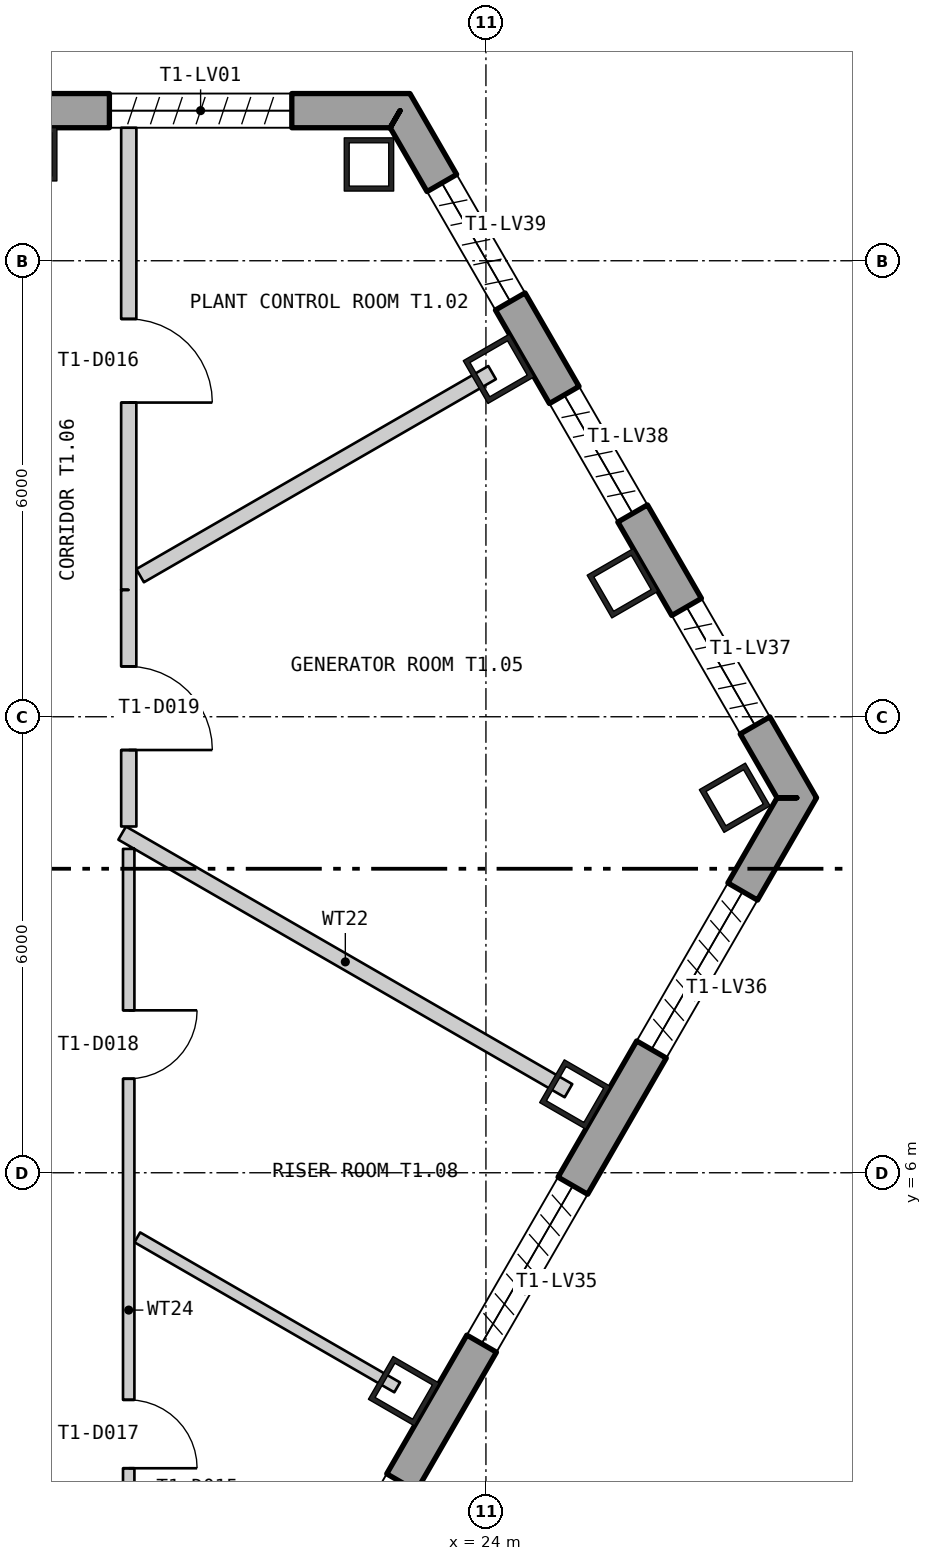
"""IFC4 building model, lengths in metres.
Left out: names, types, materials, properties, quantities, classifications, styles, units other than length and angle.
Written with IfcOpenShell. Run it as: python <this file> out.ifc"""

import sys

from ifc_helpers import new_model, si_unit, direction, frame, frame_2d, origin, origin_2d, place, context, subcontext, project, spatial, polyline, rectangle, hollow_rectangle, outline, extrude, element, fill, save


model = new_model("IFC4")
c1 = context("Model", 3, precision=1e-05, world=origin(), true_north=direction((0.0, 1.0)))
c2 = subcontext(c1, "Body", "Model", "MODEL_VIEW")
j1 = project(units=[si_unit("LENGTHUNIT", "METRE"), si_unit("PLANEANGLEUNIT", "RADIAN")], contexts=[c1])
p1 = place(None, origin())
s1 = spatial("IfcSite", under=j1, at=p1, CompositionType="ELEMENT")
p2 = place(p1, origin())
s2 = spatial("IfcBuilding", under=s1, at=p2, CompositionType="ELEMENT")
p3 = place(p2, frame((0.0, 0.0, 78.3)))
s3 = spatial("IfcBuildingStorey", under=s2, at=p3, CompositionType="ELEMENT", Elevation=78.3)
for number, where, z_axis, x_axis in (
    (1, (22.461, 19.267, 0.0), (0.0, 0.0, 1.0), (-1.0, 0.0, 0.0)),
    (2, (18.03, 19.4, 0.0), (0.0, 0.0, 1.0), (-1.0, 0.0, 0.0)),
    (3, (22.919, 3.126, 0.0), (0.0, 0.0, 1.0), (0.5, 0.866, 0.0)),
    (4, (25.172, 7.03, 0.0), (0.0, 0.0, 1.0), (0.5, 0.866, 0.0)),
    (5, (27.273, 10.934, 0.0), (0.0, 0.0, 1.0), (-0.5, 0.866, 0.0)),
    (6, (25.797, 13.756, 0.0), (0.0, 0.0, 1.0), (-0.5, 0.866, 0.0)),
    (7, (24.167, 16.578, 0.0), (0.0, 0.0, 1.0), (-0.5, 0.866, 0.0)),
):
    element("IfcColumn", number, at=place(p3, frame(where, z_axis=z_axis, x_axis=x_axis)), inside=s3, PredefinedType="COLUMN", context=c2, shape_type="SweptSolid", body=[
        extrude(hollow_rectangle(XDim=0.65, YDim=0.7, WallThickness=0.065, at=origin_2d()), origin(), (0.0, 0.0, 1.0), 6.0),
    ])
p4 = place(p3, frame((22.87, 19.975, -0.4), z_axis=(0.0, 0.0, 1.0), x_axis=(-1.0, 0.0, 0.0)))
e8 = element("IfcWall", 8, at=p4, inside=s3, PredefinedType="SOLIDWALL", context=c2, shape_type="SweptSolid", body=[
    extrude(outline(polyline([(-0.13, -0.225), (45.87, -0.225), (45.61, 0.225), (0.13, 0.225), (-0.13, -0.225)])), origin(), (0.0, 0.0, 1.0), 6.0),
])
p5 = place(p4, frame((1.424, 0.0, 1.6)))
e9 = element("IfcOpeningElement", 9, at=p5, cuts=e8, PredefinedType="OPENING", context=c2, shape_type="SweptSolid", body=[
    extrude(rectangle(XDim=2.4, YDim=3.6, at=frame_2d((1.2, 1.8))), frame((0.0, 0.235, 0.0), z_axis=(0.0, -1.0, 0.0), x_axis=(1.0, 0.0, 0.0)), (0.0, 0.0, 1.0), 0.47),
])
p6 = place(p4, frame((5.893, 0.0, 1.6)))
e10 = element("IfcOpeningElement", 10, at=p6, cuts=e8, PredefinedType="OPENING", context=c2, shape_type="SweptSolid", body=[
    extrude(rectangle(XDim=2.4, YDim=3.6, at=frame_2d((1.2, 1.8))), frame((0.0, 0.235, 0.0), z_axis=(0.0, -1.0, 0.0), x_axis=(1.0, 0.0, 0.0)), (0.0, 0.0, 1.0), 0.47),
])
p7 = place(p4, frame((10.401, 0.0, 1.6)))
e11 = element("IfcOpeningElement", 11, at=p7, cuts=e8, PredefinedType="OPENING", context=c2, shape_type="SweptSolid", body=[
    extrude(rectangle(XDim=2.4, YDim=3.6, at=frame_2d((1.2, 1.8))), frame((0.0, 0.235, 0.0), z_axis=(0.0, -1.0, 0.0), x_axis=(1.0, 0.0, 0.0)), (0.0, 0.0, 1.0), 0.47),
])
p8 = place(p4, frame((14.909, 0.0, 1.6)))
e12 = element("IfcOpeningElement", 12, at=p8, cuts=e8, PredefinedType="OPENING", context=c2, shape_type="SweptSolid", body=[
    extrude(rectangle(XDim=2.4, YDim=3.6, at=frame_2d((1.2, 1.8))), frame((0.0, 0.235, 0.0), z_axis=(0.0, -1.0, 0.0), x_axis=(1.0, 0.0, 0.0)), (0.0, 0.0, 1.0), 0.47),
])
p9 = place(p4, frame((19.416, 0.0, 1.6)))
e13 = element("IfcOpeningElement", 13, at=p9, cuts=e8, PredefinedType="OPENING", context=c2, shape_type="SweptSolid", body=[
    extrude(rectangle(XDim=2.4, YDim=3.6, at=frame_2d((1.2, 1.8))), frame((0.0, 0.235, 0.0), z_axis=(0.0, -1.0, 0.0), x_axis=(1.0, 0.0, 0.0)), (0.0, 0.0, 1.0), 0.47),
])
p10 = place(p4, frame((23.924, 0.0, 1.6)))
e14 = element("IfcOpeningElement", 14, at=p10, cuts=e8, PredefinedType="OPENING", context=c2, shape_type="SweptSolid", body=[
    extrude(rectangle(XDim=2.4, YDim=3.6, at=frame_2d((1.2, 1.8))), frame((0.0, 0.235, 0.0), z_axis=(0.0, -1.0, 0.0), x_axis=(1.0, 0.0, 0.0)), (0.0, 0.0, 1.0), 0.47),
])
p11 = place(p4, frame((28.431, 0.0, 1.6)))
e15 = element("IfcOpeningElement", 15, at=p11, cuts=e8, PredefinedType="OPENING", context=c2, shape_type="SweptSolid", body=[
    extrude(rectangle(XDim=2.4, YDim=3.6, at=frame_2d((1.2, 1.8))), frame((0.0, 0.235, 0.0), z_axis=(0.0, -1.0, 0.0), x_axis=(1.0, 0.0, 0.0)), (0.0, 0.0, 1.0), 0.47),
])
p12 = place(p4, frame((32.939, 0.0, 1.6)))
e16 = element("IfcOpeningElement", 16, at=p12, cuts=e8, PredefinedType="OPENING", context=c2, shape_type="SweptSolid", body=[
    extrude(rectangle(XDim=2.4, YDim=3.6, at=frame_2d((1.2, 1.8))), frame((0.0, 0.235, 0.0), z_axis=(0.0, -1.0, 0.0), x_axis=(1.0, 0.0, 0.0)), (0.0, 0.0, 1.0), 0.47),
])
p13 = place(p4, frame((37.447, 0.0, 1.6)))
e17 = element("IfcOpeningElement", 17, at=p13, cuts=e8, PredefinedType="OPENING", context=c2, shape_type="SweptSolid", body=[
    extrude(rectangle(XDim=2.4, YDim=3.6, at=frame_2d((1.2, 1.8))), frame((0.0, 0.235, 0.0), z_axis=(0.0, -1.0, 0.0), x_axis=(1.0, 0.0, 0.0)), (0.0, 0.0, 1.0), 0.47),
])
p14 = place(p4, frame((41.916, 0.0, 1.6)))
e18 = element("IfcOpeningElement", 18, at=p14, cuts=e8, PredefinedType="OPENING", context=c2, shape_type="SweptSolid", body=[
    extrude(rectangle(XDim=2.4, YDim=3.6, at=frame_2d((1.2, 1.8))), frame((0.0, 0.235, 0.0), z_axis=(0.0, -1.0, 0.0), x_axis=(1.0, 0.0, 0.0)), (0.0, 0.0, 1.0), 0.47),
])
p15 = place(p3, frame((5.22, -28.679, -0.18), z_axis=(0.0, 0.0, 1.0), x_axis=(0.500000711659, 0.866024992908, 0.0)))
e19 = element("IfcWall", 19, at=p15, inside=s3, PredefinedType="SOLIDWALL", context=c2, shape_type="SweptSolid", body=[
    extrude(outline(polyline([(-0.13, -0.225), (45.87, -0.225), (45.61, 0.225), (0.13, 0.225), (-0.13, -0.225)])), origin(), (0.0, 0.0, 1.0), 6.0),
])
p16 = place(p15, frame((1.424, 0.0, 1.38)))
e20 = element("IfcOpeningElement", 20, at=p16, cuts=e19, PredefinedType="OPENING", context=c2, shape_type="SweptSolid", body=[
    extrude(rectangle(XDim=2.4, YDim=3.6, at=frame_2d((1.2, 1.8))), frame((0.0, 0.235, 0.0), z_axis=(0.0, -1.0, 0.0), x_axis=(1.0, 0.0, 0.0)), (0.0, 0.0, 1.0), 0.47),
])
p17 = place(p15, frame((5.893, 0.0, 1.38)))
e21 = element("IfcOpeningElement", 21, at=p17, cuts=e19, PredefinedType="OPENING", context=c2, shape_type="SweptSolid", body=[
    extrude(rectangle(XDim=2.4, YDim=3.6, at=frame_2d((1.2, 1.8))), frame((0.0, 0.235, 0.0), z_axis=(0.0, -1.0, 0.0), x_axis=(1.0, 0.0, 0.0)), (0.0, 0.0, 1.0), 0.47),
])
p18 = place(p15, frame((10.401, 0.0, 1.38)))
e22 = element("IfcOpeningElement", 22, at=p18, cuts=e19, PredefinedType="OPENING", context=c2, shape_type="SweptSolid", body=[
    extrude(rectangle(XDim=2.4, YDim=3.6, at=frame_2d((1.2, 1.8))), frame((0.0, 0.235, 0.0), z_axis=(0.0, -1.0, 0.0), x_axis=(1.0, 0.0, 0.0)), (0.0, 0.0, 1.0), 0.47),
])
p19 = place(p15, frame((14.909, 0.0, 1.38)))
e23 = element("IfcOpeningElement", 23, at=p19, cuts=e19, PredefinedType="OPENING", context=c2, shape_type="SweptSolid", body=[
    extrude(rectangle(XDim=2.4, YDim=3.6, at=frame_2d((1.2, 1.8))), frame((0.0, 0.235, 0.0), z_axis=(0.0, -1.0, 0.0), x_axis=(1.0, 0.0, 0.0)), (0.0, 0.0, 1.0), 0.47),
])
p20 = place(p15, frame((19.416, 0.0, 1.38)))
e24 = element("IfcOpeningElement", 24, at=p20, cuts=e19, PredefinedType="OPENING", context=c2, shape_type="SweptSolid", body=[
    extrude(rectangle(XDim=2.4, YDim=3.6, at=frame_2d((1.2, 1.8))), frame((0.0, 0.235, 0.0), z_axis=(0.0, -1.0, 0.0), x_axis=(1.0, 0.0, 0.0)), (0.0, 0.0, 1.0), 0.47),
])
p21 = place(p15, frame((23.924, 0.0, 1.38)))
e25 = element("IfcOpeningElement", 25, at=p21, cuts=e19, PredefinedType="OPENING", context=c2, shape_type="SweptSolid", body=[
    extrude(rectangle(XDim=2.4, YDim=3.6, at=frame_2d((1.2, 1.8))), frame((0.0, 0.235, 0.0), z_axis=(0.0, -1.0, 0.0), x_axis=(1.0, 0.0, 0.0)), (0.0, 0.0, 1.0), 0.47),
])
p22 = place(p15, frame((28.431, 0.0, 1.38)))
e26 = element("IfcOpeningElement", 26, at=p22, cuts=e19, PredefinedType="OPENING", context=c2, shape_type="SweptSolid", body=[
    extrude(rectangle(XDim=2.4, YDim=3.6, at=frame_2d((1.2, 1.8))), frame((0.0, 0.235, 0.0), z_axis=(0.0, -1.0, 0.0), x_axis=(1.0, 0.0, 0.0)), (0.0, 0.0, 1.0), 0.47),
])
p23 = place(p15, frame((32.939, 0.0, 1.38)))
e27 = element("IfcOpeningElement", 27, at=p23, cuts=e19, PredefinedType="OPENING", context=c2, shape_type="SweptSolid", body=[
    extrude(rectangle(XDim=2.4, YDim=3.6, at=frame_2d((1.2, 1.8))), frame((0.0, 0.235, 0.0), z_axis=(0.0, -1.0, 0.0), x_axis=(1.0, 0.0, 0.0)), (0.0, 0.0, 1.0), 0.47),
])
p24 = place(p15, frame((37.447, 0.0, 1.38)))
e28 = element("IfcOpeningElement", 28, at=p24, cuts=e19, PredefinedType="OPENING", context=c2, shape_type="SweptSolid", body=[
    extrude(rectangle(XDim=2.4, YDim=3.6, at=frame_2d((1.2, 1.8))), frame((0.0, 0.235, 0.0), z_axis=(0.0, -1.0, 0.0), x_axis=(1.0, 0.0, 0.0)), (0.0, 0.0, 1.0), 0.47),
])
p25 = place(p15, frame((41.916, 0.0, 1.38)))
e29 = element("IfcOpeningElement", 29, at=p25, cuts=e19, PredefinedType="OPENING", context=c2, shape_type="SweptSolid", body=[
    extrude(rectangle(XDim=2.4, YDim=3.6, at=frame_2d((1.2, 1.8))), frame((0.0, 0.235, 0.0), z_axis=(0.0, -1.0, 0.0), x_axis=(1.0, 0.0, 0.0)), (0.0, 0.0, 1.0), 0.47),
])
p26 = place(p3, frame((28.09, 10.934, -0.4), z_axis=(0.0, 0.0, 1.0), x_axis=(-0.499999104984, 0.866025920521, 0.0)))
e30 = element("IfcWall", 30, at=p26, inside=s3, PredefinedType="SOLIDWALL", context=c2, shape_type="SweptSolid", body=[
    extrude(outline(polyline([(-0.13, -0.225), (10.57, -0.225), (10.31, 0.225), (0.13, 0.225), (-0.13, -0.225)])), origin(), (0.0, 0.0, 1.0), 6.0),
])
p27 = place(p26, frame((1.1, 0.0, 1.6)))
e31 = element("IfcOpeningElement", 31, at=p27, cuts=e30, PredefinedType="OPENING", context=c2, shape_type="SweptSolid", body=[
    extrude(rectangle(XDim=1.8, YDim=3.6, at=frame_2d((0.9, 1.8))), frame((0.0, 0.235, 0.0), z_axis=(0.0, -1.0, 0.0), x_axis=(1.0, 0.0, 0.0)), (0.0, 0.0, 1.0), 0.47),
])
p28 = place(p26, frame((4.32, 0.0, 1.6)))
e32 = element("IfcOpeningElement", 32, at=p28, cuts=e30, PredefinedType="OPENING", context=c2, shape_type="SweptSolid", body=[
    extrude(rectangle(XDim=1.8, YDim=3.6, at=frame_2d((0.9, 1.8))), frame((0.0, 0.235, 0.0), z_axis=(0.0, -1.0, 0.0), x_axis=(1.0, 0.0, 0.0)), (0.0, 0.0, 1.0), 0.47),
])
p29 = place(p26, frame((7.54, 0.0, 1.6)))
e33 = element("IfcOpeningElement", 33, at=p29, cuts=e30, PredefinedType="OPENING", context=c2, shape_type="SweptSolid", body=[
    extrude(rectangle(XDim=1.8, YDim=3.6, at=frame_2d((0.9, 1.8))), frame((0.0, 0.235, 0.0), z_axis=(0.0, -1.0, 0.0), x_axis=(1.0, 0.0, 0.0)), (0.0, 0.0, 1.0), 0.47),
])
p30 = place(p3, frame((19.214, 10.469, 0.0), z_axis=(0.0, 0.0, 1.0), x_axis=(0.866102085121, -0.499867160503, 0.0)))
e34 = element("IfcWall", 34, at=p30, inside=s3, PredefinedType="PARTITIONING", context=c2, shape_type="SweptSolid", body=[
    extrude(rectangle(XDim=6.78, YDim=0.2, at=frame_2d((3.39, 0.0))), origin(), (0.0, 0.0, 1.0), 5.8),
])
p31 = place(p3, frame((19.3, 13.669, 0.0), z_axis=(0.0, 0.0, 1.0), x_axis=(0.000164446635, 0.999999986479, 0.0)))
e35 = element("IfcWall", 35, at=p31, inside=s3, PredefinedType="PARTITIONING", context=c2, shape_type="SweptSolid", body=[
    extrude(rectangle(XDim=6.081, YDim=0.2, at=frame_2d((3.041, 0.0))), origin(), (0.0, 0.0, 1.0), 5.8),
])
p32 = place(p31, frame((2.465, 0.0, 0.0)))
e36 = element("IfcOpeningElement", 36, at=p32, cuts=e35, PredefinedType="OPENING", context=c2, shape_type="SweptSolid", body=[
    extrude(rectangle(XDim=1.1, YDim=2.1, at=frame_2d((0.55, 1.05))), frame((0.0, 0.11, 0.0), z_axis=(0.0, -1.0, 0.0), x_axis=(1.0, 0.0, 0.0)), (0.0, 0.0, 1.0), 0.22),
])
p33 = place(p3, frame((19.3, -1.875, 0.0), z_axis=(0.0, 0.0, 1.0), x_axis=(0.0, 1.0, 0.0)))
e37 = element("IfcWall", 37, at=p33, inside=s3, PredefinedType="PARTITIONING", context=c2, shape_type="SweptSolid", body=[
    extrude(rectangle(XDim=12.136, YDim=0.15, at=frame_2d((6.068, 0.0))), origin(), (0.0, 0.0, 1.0), 5.8),
])
p34 = place(p33, frame((3.987, 0.0, 0.0)))
e38 = element("IfcOpeningElement", 38, at=p34, cuts=e37, PredefinedType="OPENING", context=c2, shape_type="SweptSolid", body=[
    extrude(rectangle(XDim=0.9, YDim=2.1, at=frame_2d((0.45, 1.05))), frame((0.0, 0.085, 0.0), z_axis=(0.0, -1.0, 0.0), x_axis=(1.0, 0.0, 0.0)), (0.0, 0.0, 1.0), 0.17),
])
p35 = place(p33, frame((9.112, 0.0, 0.0)))
e39 = element("IfcOpeningElement", 39, at=p35, cuts=e37, PredefinedType="OPENING", context=c2, shape_type="SweptSolid", body=[
    extrude(rectangle(XDim=0.9, YDim=2.1, at=frame_2d((0.45, 1.05))), frame((0.0, 0.085, 0.0), z_axis=(0.0, -1.0, 0.0), x_axis=(1.0, 0.0, 0.0)), (0.0, 0.0, 1.0), 0.17),
])
p36 = place(p3, frame((19.3, 13.669, 0.0), z_axis=(0.0, 0.0, 1.0), x_axis=(0.00032123352, -0.999999948405, 0.0)))
e40 = element("IfcWall", 40, at=p36, inside=s3, PredefinedType="PARTITIONING", context=c2, shape_type="SweptSolid", body=[
    extrude(rectangle(XDim=3.113, YDim=0.2, at=frame_2d((1.556, 0.0))), origin(), (0.0, 0.0, 1.0), 5.8),
])
p37 = place(p36, frame((1.007, 0.0, 0.0)))
e41 = element("IfcOpeningElement", 41, at=p37, cuts=e40, PredefinedType="OPENING", context=c2, shape_type="SweptSolid", body=[
    extrude(rectangle(XDim=1.1, YDim=2.1, at=frame_2d((0.55, 1.05))), frame((0.0, 0.11, 0.0), z_axis=(0.0, -1.0, 0.0), x_axis=(1.0, 0.0, 0.0)), (0.0, 0.0, 1.0), 0.22),
])
p38 = place(p3, frame((19.413, 5.15, 0.0), z_axis=(0.0, 0.0, 1.0), x_axis=(0.866021079084, -0.500007490527, 0.0)))
e42 = element("IfcWall", 42, at=p38, inside=s3, PredefinedType="PARTITIONING", context=c2, shape_type="SweptSolid", body=[
    extrude(rectangle(XDim=3.948, YDim=0.15, at=frame_2d((1.974, 0.0))), origin(), (0.0, 0.0, 1.0), 5.8),
])
p39 = place(p3, frame((19.45, 13.856, 0.0), z_axis=(0.0, 0.0, 1.0), x_axis=(0.866163788575, 0.499760233874, 0.0)))
e43 = element("IfcWall", 43, at=p39, inside=s3, PredefinedType="PARTITIONING", context=c2, shape_type="SweptSolid", body=[
    extrude(rectangle(XDim=5.347, YDim=0.2, at=frame_2d((2.673, 0.0))), origin(), (0.0, 0.0, 1.0), 5.8),
])
p40 = place(p32, origin())
e44 = element("IfcDoor", 44, at=p40, inside=s3, OperationType="SINGLE_SWING_LEFT", PredefinedType="DOOR", context=c2, shape_type="SweptSolid", body=[
    extrude(rectangle(XDim=1.1, YDim=2.1, at=frame_2d((0.55, 1.05))), frame((0.0, 0.025, 0.0), z_axis=(0.0, -1.0, 0.0), x_axis=(1.0, 0.0, 0.0)), (0.0, 0.0, 1.0), 0.05),
])
fill(e36, e44)
p41 = place(p34, origin())
e45 = element("IfcDoor", 45, at=p41, inside=s3, OperationType="SINGLE_SWING_LEFT", PredefinedType="DOOR", context=c2, shape_type="SweptSolid", body=[
    extrude(rectangle(XDim=0.9, YDim=2.1, at=frame_2d((0.45, 1.05))), frame((0.0, 0.025, 0.0), z_axis=(0.0, -1.0, 0.0), x_axis=(1.0, 0.0, 0.0)), (0.0, 0.0, 1.0), 0.05),
])
fill(e38, e45)
p42 = place(p35, origin())
e46 = element("IfcDoor", 46, at=p42, inside=s3, OperationType="SINGLE_SWING_RIGHT", PredefinedType="DOOR", context=c2, shape_type="SweptSolid", body=[
    extrude(rectangle(XDim=0.9, YDim=2.1, at=frame_2d((0.45, 1.05))), frame((0.0, 0.025, 0.0), z_axis=(0.0, -1.0, 0.0), x_axis=(1.0, 0.0, 0.0)), (0.0, 0.0, 1.0), 0.05),
])
fill(e39, e46)
p43 = place(p37, origin())
e47 = element("IfcDoor", 47, at=p43, inside=s3, OperationType="SINGLE_SWING_LEFT", PredefinedType="DOOR", context=c2, shape_type="SweptSolid", body=[
    extrude(rectangle(XDim=1.1, YDim=2.1, at=frame_2d((0.55, 1.05))), frame((0.0, 0.025, 0.0), z_axis=(0.0, -1.0, 0.0), x_axis=(1.0, 0.0, 0.0)), (0.0, 0.0, 1.0), 0.05),
])
fill(e41, e47)
save(model, sys.argv[1])
